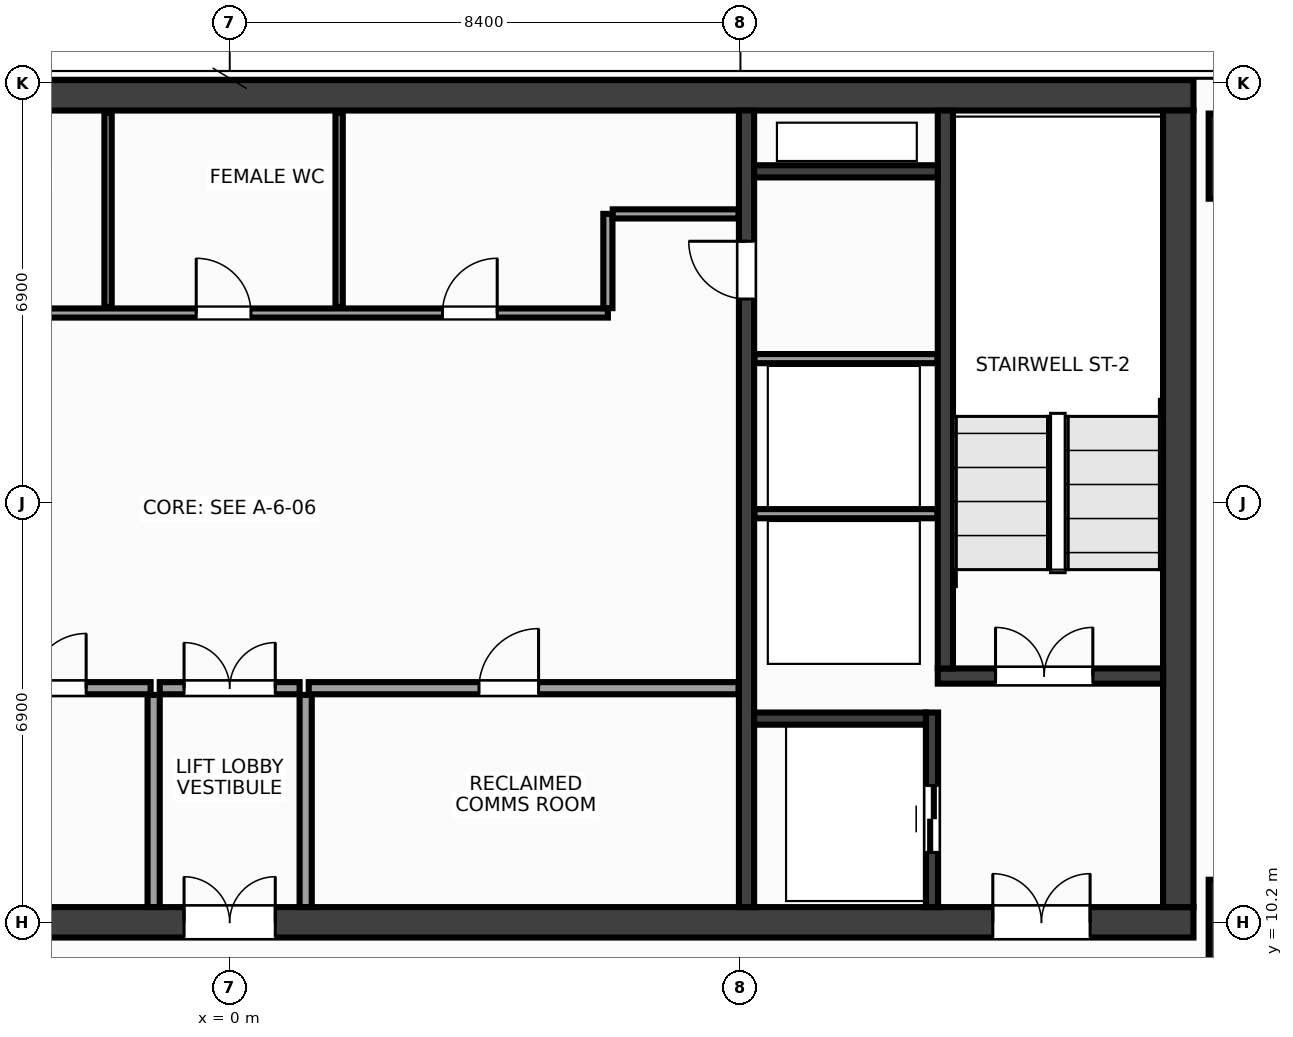
"""IFC4 building model, lengths in metres.
Left out: names, types, materials, properties, quantities, classifications, styles, units other than length and angle.
Written with IfcOpenShell. Run it as: python <this file> out.ifc"""

import sys

from ifc_helpers import new_model, si_unit, direction, frame, frame_2d, origin, origin_2d, place, context, subcontext, project, spatial, rectangle, extrude, source, transform, mapped, element, fill, save


model = new_model("IFC4")
c1 = context("Model", 3, precision=1e-05, world=origin(), true_north=direction((0.0, 1.0)))
c2 = subcontext(c1, "Body", "Model", "MODEL_VIEW")
j1 = project(units=[si_unit("LENGTHUNIT", "METRE"), si_unit("PLANEANGLEUNIT", "RADIAN")], contexts=[c1])
p1 = place(None, origin())
s1 = spatial("IfcSite", under=j1, at=p1, CompositionType="ELEMENT")
p2 = place(p1, origin())
s2 = spatial("IfcBuilding", under=s1, at=p2, CompositionType="ELEMENT")
p3 = place(p2, frame((0.0, 0.0, 239.6)))
s3 = spatial("IfcBuildingStorey", under=s2, at=p3, CompositionType="ELEMENT", Elevation=239.6)
m1 = source(origin(), c2, "Body", "SweptSolid", [
    extrude(rectangle(XDim=31.7, YDim=0.5, at=frame_2d((15.85, 0.0))), origin(), (0.0, 0.0, 1.0), 3.6),
])
p4 = place(p3, frame((-15.85, 23.8, 0.0), z_axis=(0.0, 0.0, 1.0), x_axis=(1.0, 0.0, 0.0)))
e1 = element("IfcWall", 1, at=p4, inside=s3, PredefinedType="SHEAR", context=c2, shape_type="MappedRepresentation", body=[
    mapped(m1, transform((0.0, 0.0, 0.0), x_axis=(1.0, 0.0, 0.0), y_axis=(0.0, 1.0, 0.0), z_axis=(0.0, 0.0, 1.0), scale=1.0)),
])
p5 = place(p3, frame((-15.85, 10.2, 0.0), z_axis=(0.0, 0.0, 1.0), x_axis=(1.0, 0.0, 0.0)))
e2 = element("IfcWall", 2, at=p5, inside=s3, PredefinedType="SHEAR", context=c2, shape_type="MappedRepresentation", body=[
    mapped(m1, transform((0.0, 0.0, 0.0), x_axis=(1.0, 0.0, 0.0), y_axis=(0.0, 1.0, 0.0), z_axis=(0.0, 0.0, 1.0), scale=1.0)),
])
p6 = place(p5, frame((1.7, 0.0, 0.0)))
e3 = element("IfcOpeningElement", 3, at=p6, cuts=e2, PredefinedType="OPENING", context=c2, shape_type="SweptSolid", body=[
    extrude(rectangle(XDim=1.6, YDim=2.15, at=frame_2d((0.8, 1.075))), frame((0.0, 0.262, 0.0), z_axis=(0.0, -1.0, 0.0), x_axis=(1.0, 0.0, 0.0)), (0.0, 0.0, 1.0), 0.524),
])
p7 = place(p5, frame((28.4, 0.0, 0.0)))
e4 = element("IfcOpeningElement", 4, at=p7, cuts=e2, PredefinedType="OPENING", context=c2, shape_type="SweptSolid", body=[
    extrude(rectangle(XDim=1.6, YDim=2.15, at=frame_2d((0.8, 1.075))), frame((0.0, 0.262, 0.0), z_axis=(0.0, -1.0, 0.0), x_axis=(1.0, 0.0, 0.0)), (0.0, 0.0, 1.0), 0.524),
])
p8 = place(p5, frame((15.1, 0.0, 0.0)))
e5 = element("IfcOpeningElement", 5, at=p8, cuts=e2, PredefinedType="OPENING", context=c2, shape_type="SweptSolid", body=[
    extrude(rectangle(XDim=1.5, YDim=2.2, at=frame_2d((0.75, 1.1))), frame((0.0, 0.262, 0.0), z_axis=(0.0, -1.0, 0.0), x_axis=(1.0, 0.0, 0.0)), (0.0, 0.0, 1.0), 0.524),
])
m2 = source(origin(), c2, "Body", "SweptSolid", [
    extrude(rectangle(XDim=13.1, YDim=0.5, at=frame_2d((6.55, 0.0))), origin(), (0.0, 0.0, 1.0), 3.6),
])
p9 = place(p3, frame((15.6, 10.45, 0.0), z_axis=(0.0, 0.0, 1.0), x_axis=(0.0, 1.0, 0.0)))
e6 = element("IfcWall", 6, at=p9, inside=s3, PredefinedType="SHEAR", context=c2, shape_type="MappedRepresentation", body=[
    mapped(m2, transform((0.0, 0.0, 0.0), x_axis=(1.0, 0.0, 0.0), y_axis=(0.0, 1.0, 0.0), z_axis=(0.0, 0.0, 1.0), scale=1.0)),
])
m3 = source(origin(), c2, "Body", "SweptSolid", [
    extrude(rectangle(XDim=13.1, YDim=0.25, at=frame_2d((6.55, 0.0))), origin(), (0.0, 0.0, 1.0), 3.6),
])
p10 = place(p3, frame((8.5, 10.45, 0.0), z_axis=(0.0, 0.0, 1.0), x_axis=(0.0, 1.0, 0.0)))
e7 = element("IfcWall", 7, at=p10, inside=s3, PredefinedType="SHEAR", context=c2, shape_type="MappedRepresentation", body=[
    mapped(m3, transform((0.0, 0.0, 0.0), x_axis=(1.0, 0.0, 0.0), y_axis=(0.0, 1.0, 0.0), z_axis=(0.0, 0.0, 1.0), scale=1.0)),
])
p11 = place(p10, frame((10.0, 0.0, 0.0)))
e8 = element("IfcOpeningElement", 8, at=p11, cuts=e7, PredefinedType="OPENING", context=c2, shape_type="SweptSolid", body=[
    extrude(rectangle(XDim=0.95, YDim=2.15, at=frame_2d((0.475, 1.075))), frame((0.0, 0.137, 0.0), z_axis=(0.0, -1.0, 0.0), x_axis=(1.0, 0.0, 0.0)), (0.0, 0.0, 1.0), 0.274),
])
m4 = source(origin(), c2, "Body", "SweptSolid", [
    extrude(rectangle(XDim=3.705, YDim=0.25, at=frame_2d((1.853, 0.0))), origin(), (0.0, 0.0, 1.0), 3.6),
])
p12 = place(p3, frame((11.645, 14.25, 0.0), z_axis=(0.0, 0.0, 1.0), x_axis=(1.0, 0.0, 0.0)))
e9 = element("IfcWall", 9, at=p12, inside=s3, PredefinedType="SHEAR", context=c2, shape_type="MappedRepresentation", body=[
    mapped(m4, transform((0.0, 0.0, 0.0), x_axis=(1.0, 0.0, 0.0), y_axis=(0.0, 1.0, 0.0), z_axis=(0.0, 0.0, 1.0), scale=1.0)),
])
p13 = place(p12, frame((0.95, 0.0, 0.0)))
e10 = element("IfcOpeningElement", 10, at=p13, cuts=e9, PredefinedType="OPENING", context=c2, shape_type="SweptSolid", body=[
    extrude(rectangle(XDim=1.6, YDim=2.15, at=frame_2d((0.8, 1.075))), frame((0.0, 0.137, 0.0), z_axis=(0.0, -1.0, 0.0), x_axis=(1.0, 0.0, 0.0)), (0.0, 0.0, 1.0), 0.274),
])
m5 = source(origin(), c2, "Body", "SweptSolid", [
    extrude(rectangle(XDim=9.175, YDim=0.25, at=frame_2d((4.587, 0.0))), origin(), (0.0, 0.0, 1.0), 3.6),
])
p14 = place(p3, frame((11.77, 14.375, 0.0), z_axis=(0.0, 0.0, 1.0), x_axis=(0.0, 1.0, 0.0)))
e11 = element("IfcWall", 11, at=p14, inside=s3, PredefinedType="SHEAR", context=c2, shape_type="MappedRepresentation", body=[
    mapped(m5, transform((0.0, 0.0, 0.0), x_axis=(1.0, 0.0, 0.0), y_axis=(0.0, 1.0, 0.0), z_axis=(0.0, 0.0, 1.0), scale=1.0)),
])
m6 = source(origin(), c2, "Body", "SweptSolid", [
    extrude(rectangle(XDim=3.2, YDim=0.2, at=frame_2d((1.6, 0.0))), origin(), (0.0, 0.0, 1.0), 3.6),
])
p15 = place(p3, frame((11.55, 10.45, 0.0), z_axis=(0.0, 0.0, 1.0), x_axis=(0.0, 1.0, 0.0)))
e12 = element("IfcWall", 12, at=p15, inside=s3, PredefinedType="SHEAR", context=c2, shape_type="MappedRepresentation", body=[
    mapped(m6, transform((0.0, 0.0, 0.0), x_axis=(1.0, 0.0, 0.0), y_axis=(0.0, 1.0, 0.0), z_axis=(0.0, 0.0, 1.0), scale=1.0)),
])
p16 = place(p15, frame((0.9, 0.0, 0.0)))
e13 = element("IfcOpeningElement", 13, at=p16, cuts=e12, PredefinedType="OPENING", context=c2, shape_type="SweptSolid", body=[
    extrude(rectangle(XDim=1.1, YDim=2.15, at=frame_2d((0.55, 1.075))), frame((0.0, 0.112, 0.0), z_axis=(0.0, -1.0, 0.0), x_axis=(1.0, 0.0, 0.0)), (0.0, 0.0, 1.0), 0.224),
])
m7 = source(origin(), c2, "Body", "SweptSolid", [
    extrude(rectangle(XDim=2.825, YDim=0.2, at=frame_2d((1.413, 0.0))), origin(), (0.0, 0.0, 1.0), 3.6),
])
p17 = place(p3, frame((8.625, 13.55, 0.0), z_axis=(0.0, 0.0, 1.0), x_axis=(1.0, 0.0, 0.0)))
e14 = element("IfcWall", 14, at=p17, inside=s3, PredefinedType="SHEAR", context=c2, shape_type="MappedRepresentation", body=[
    mapped(m7, transform((0.0, 0.0, 0.0), x_axis=(1.0, 0.0, 0.0), y_axis=(0.0, 1.0, 0.0), z_axis=(0.0, 0.0, 1.0), scale=1.0)),
])
m8 = source(origin(), c2, "Body", "SweptSolid", [
    extrude(rectangle(XDim=3.02, YDim=0.2, at=frame_2d((1.51, 0.0))), origin(), (0.0, 0.0, 1.0), 3.6),
])
p18 = place(p3, frame((8.625, 22.55, 0.0), z_axis=(0.0, 0.0, 1.0), x_axis=(1.0, 0.0, 0.0)))
e15 = element("IfcWall", 15, at=p18, inside=s3, PredefinedType="SHEAR", context=c2, shape_type="MappedRepresentation", body=[
    mapped(m8, transform((0.0, 0.0, 0.0), x_axis=(1.0, 0.0, 0.0), y_axis=(0.0, 1.0, 0.0), z_axis=(0.0, 0.0, 1.0), scale=1.0)),
])
m9 = source(origin(), c2, "Body", "SweptSolid", [
    extrude(rectangle(XDim=1.4, YDim=1.4, at=origin_2d()), origin(), (0.0, 0.0, 1.0), 3.6),
])
for number, where, z_axis, x_axis in (
    (16, (16.8, 10.2, 0.0), (0.0, 0.0, 1.0), (1.0, 0.0, 0.0)),
    (17, (16.8, 22.8, 0.0), (0.0, 0.0, 1.0), (1.0, 0.0, 0.0)),
):
    element("IfcColumn", number, at=place(p3, frame(where, z_axis=z_axis, x_axis=x_axis)), inside=s3, PredefinedType="COLUMN", context=c2, shape_type="MappedRepresentation", body=[
        mapped(m9, transform((0.0, 0.0, 0.0), x_axis=(1.0, 0.0, 0.0), y_axis=(0.0, 1.0, 0.0), z_axis=(0.0, 0.0, 1.0), scale=1.0)),
    ])
m10 = source(origin(), c2, "Body", "SweptSolid", [
    extrude(rectangle(XDim=3.01, YDim=0.15, at=frame_2d((1.505, 0.0))), origin(), (0.0, 0.0, 1.0), 3.37),
])
for number, where, z_axis, x_axis in (
    (18, (8.63, 16.92, 0.0), (0.0, 0.0, 1.0), (1.0, 0.0, 0.0)),
    (19, (8.63, 19.47, 0.0), (0.0, 0.0, 1.0), (1.0, 0.0, 0.0)),
):
    element("IfcWall", number, at=place(p3, frame(where, z_axis=z_axis, x_axis=x_axis)), inside=s3, PredefinedType="PARTITIONING", context=c2, shape_type="MappedRepresentation", body=[
        mapped(m10, transform((0.0, 0.0, 0.0), x_axis=(1.0, 0.0, 0.0), y_axis=(0.0, 1.0, 0.0), z_axis=(0.0, 0.0, 1.0), scale=1.0)),
    ])
m11 = source(origin(), c2, "Body", "SweptSolid", [
    extrude(rectangle(XDim=7.07, YDim=0.2, at=frame_2d((3.535, 0.0))), origin(), (0.0, 0.0, 1.0), 3.37),
])
p19 = place(p3, frame((-8.37, 14.05, 0.0), z_axis=(0.0, 0.0, 1.0), x_axis=(1.0, 0.0, 0.0)))
e20 = element("IfcWall", 20, at=p19, inside=s3, PredefinedType="PARTITIONING", context=c2, shape_type="MappedRepresentation", body=[
    mapped(m11, transform((0.0, 0.0, 0.0), x_axis=(1.0, 0.0, 0.0), y_axis=(0.0, 1.0, 0.0), z_axis=(0.0, 0.0, 1.0), scale=1.0)),
])
p20 = place(p19, frame((1.66, 0.0, 0.0)))
e21 = element("IfcOpeningElement", 21, at=p20, cuts=e20, PredefinedType="OPENING", context=c2, shape_type="SweptSolid", body=[
    extrude(rectangle(XDim=0.9, YDim=2.15, at=frame_2d((0.45, 1.075))), frame((0.0, 0.112, 0.0), z_axis=(0.0, -1.0, 0.0), x_axis=(1.0, 0.0, 0.0)), (0.0, 0.0, 1.0), 0.224),
])
p21 = place(p19, frame((5.11, 0.0, 0.0)))
e22 = element("IfcOpeningElement", 22, at=p21, cuts=e20, PredefinedType="OPENING", context=c2, shape_type="SweptSolid", body=[
    extrude(rectangle(XDim=0.9, YDim=2.15, at=frame_2d((0.45, 1.075))), frame((0.0, 0.112, 0.0), z_axis=(0.0, -1.0, 0.0), x_axis=(1.0, 0.0, 0.0)), (0.0, 0.0, 1.0), 0.224),
])
p22 = place(p3, frame((1.3, 14.05, 0.0), z_axis=(0.0, 0.0, 1.0), x_axis=(1.0, 0.0, 0.0)))
e23 = element("IfcWall", 23, at=p22, inside=s3, PredefinedType="PARTITIONING", context=c2, shape_type="MappedRepresentation", body=[
    mapped(m11, transform((0.0, 0.0, 0.0), x_axis=(1.0, 0.0, 0.0), y_axis=(0.0, 1.0, 0.0), z_axis=(0.0, 0.0, 1.0), scale=1.0)),
])
p23 = place(p22, frame((2.8, 0.0, 0.0)))
e24 = element("IfcOpeningElement", 24, at=p23, cuts=e23, PredefinedType="OPENING", context=c2, shape_type="SweptSolid", body=[
    extrude(rectangle(XDim=0.98, YDim=2.15, at=frame_2d((0.49, 1.075))), frame((0.0, 0.112, 0.0), z_axis=(0.0, -1.0, 0.0), x_axis=(1.0, 0.0, 0.0)), (0.0, 0.0, 1.0), 0.224),
])
m12 = source(origin(), c2, "Body", "SweptSolid", [
    extrude(rectangle(XDim=3.49, YDim=0.2, at=frame_2d((1.745, 0.0))), origin(), (0.0, 0.0, 1.0), 3.37),
])
for number, where, z_axis, x_axis in (
    (25, (-1.25, 10.45, 0.0), (0.0, 0.0, 1.0), (0.0, 1.0, 0.0)),
    (26, (1.25, 10.45, 0.0), (0.0, 0.0, 1.0), (0.0, 1.0, 0.0)),
):
    element("IfcWall", number, at=place(p3, frame(where, z_axis=z_axis, x_axis=x_axis)), inside=s3, PredefinedType="PARTITIONING", context=c2, shape_type="MappedRepresentation", body=[
        mapped(m12, transform((0.0, 0.0, 0.0), x_axis=(1.0, 0.0, 0.0), y_axis=(0.0, 1.0, 0.0), z_axis=(0.0, 0.0, 1.0), scale=1.0)),
    ])
m13 = source(origin(), c2, "Body", "SweptSolid", [
    extrude(rectangle(XDim=2.3, YDim=0.2, at=frame_2d((1.15, 0.0))), origin(), (0.0, 0.0, 1.0), 3.37),
])
p24 = place(p3, frame((-1.15, 14.05, 0.0), z_axis=(0.0, 0.0, 1.0), x_axis=(1.0, 0.0, 0.0)))
e27 = element("IfcWall", 27, at=p24, inside=s3, PredefinedType="PARTITIONING", context=c2, shape_type="MappedRepresentation", body=[
    mapped(m13, transform((0.0, 0.0, 0.0), x_axis=(1.0, 0.0, 0.0), y_axis=(0.0, 1.0, 0.0), z_axis=(0.0, 0.0, 1.0), scale=1.0)),
])
p25 = place(p24, frame((0.4, 0.0, 0.0)))
e28 = element("IfcOpeningElement", 28, at=p25, cuts=e27, PredefinedType="OPENING", context=c2, shape_type="SweptSolid", body=[
    extrude(rectangle(XDim=1.5, YDim=2.2, at=frame_2d((0.75, 1.1))), frame((0.0, 0.112, 0.0), z_axis=(0.0, -1.0, 0.0), x_axis=(1.0, 0.0, 0.0)), (0.0, 0.0, 1.0), 0.224),
])
m14 = source(origin(), c2, "Body", "SweptSolid", [
    extrude(rectangle(XDim=14.59, YDim=0.15, at=frame_2d((7.295, 0.0))), origin(), (0.0, 0.0, 1.0), 3.37),
])
p26 = place(p3, frame((-8.37, 20.22, 0.0), z_axis=(0.0, 0.0, 1.0), x_axis=(1.0, 0.0, 0.0)))
e29 = element("IfcWall", 29, at=p26, inside=s3, PredefinedType="PARTITIONING", context=c2, shape_type="MappedRepresentation", body=[
    mapped(m14, transform((0.0, 0.0, 0.0), x_axis=(1.0, 0.0, 0.0), y_axis=(0.0, 1.0, 0.0), z_axis=(0.0, 0.0, 1.0), scale=1.0)),
])
p27 = place(p26, frame((1.06, 0.0, 0.0)))
e30 = element("IfcOpeningElement", 30, at=p27, cuts=e29, PredefinedType="OPENING", context=c2, shape_type="SweptSolid", body=[
    extrude(rectangle(XDim=0.9, YDim=2.15, at=frame_2d((0.45, 1.075))), frame((0.0, 0.087, 0.0), z_axis=(0.0, -1.0, 0.0), x_axis=(1.0, 0.0, 0.0)), (0.0, 0.0, 1.0), 0.174),
])
p28 = place(p26, frame((4.22, 0.0, 0.0)))
e31 = element("IfcOpeningElement", 31, at=p28, cuts=e29, PredefinedType="OPENING", context=c2, shape_type="SweptSolid", body=[
    extrude(rectangle(XDim=0.9, YDim=2.15, at=frame_2d((0.45, 1.075))), frame((0.0, 0.087, 0.0), z_axis=(0.0, -1.0, 0.0), x_axis=(1.0, 0.0, 0.0)), (0.0, 0.0, 1.0), 0.174),
])
p29 = place(p26, frame((7.82, 0.0, 0.0)))
e32 = element("IfcOpeningElement", 32, at=p29, cuts=e29, PredefinedType="OPENING", context=c2, shape_type="SweptSolid", body=[
    extrude(rectangle(XDim=0.9, YDim=2.15, at=frame_2d((0.45, 1.075))), frame((0.0, 0.087, 0.0), z_axis=(0.0, -1.0, 0.0), x_axis=(1.0, 0.0, 0.0)), (0.0, 0.0, 1.0), 0.174),
])
p30 = place(p26, frame((11.87, 0.0, 0.0)))
e33 = element("IfcOpeningElement", 33, at=p30, cuts=e29, PredefinedType="OPENING", context=c2, shape_type="SweptSolid", body=[
    extrude(rectangle(XDim=0.9, YDim=2.15, at=frame_2d((0.45, 1.075))), frame((0.0, 0.087, 0.0), z_axis=(0.0, -1.0, 0.0), x_axis=(1.0, 0.0, 0.0)), (0.0, 0.0, 1.0), 0.174),
])
m15 = source(origin(), c2, "Body", "SweptSolid", [
    extrude(rectangle(XDim=1.55, YDim=0.15, at=frame_2d((0.775, 0.0))), origin(), (0.0, 0.0, 1.0), 3.37),
])
p31 = place(p3, frame((6.22, 20.3, 0.0), z_axis=(0.0, 0.0, 1.0), x_axis=(0.0, 1.0, 0.0)))
e34 = element("IfcWall", 34, at=p31, inside=s3, PredefinedType="PARTITIONING", context=c2, shape_type="MappedRepresentation", body=[
    mapped(m15, transform((0.0, 0.0, 0.0), x_axis=(1.0, 0.0, 0.0), y_axis=(0.0, 1.0, 0.0), z_axis=(0.0, 0.0, 1.0), scale=1.0)),
])
m16 = source(origin(), c2, "Body", "SweptSolid", [
    extrude(rectangle(XDim=2.07, YDim=0.15, at=frame_2d((1.035, 0.0))), origin(), (0.0, 0.0, 1.0), 3.37),
])
p32 = place(p3, frame((6.3, 21.85, 0.0), z_axis=(0.0, 0.0, 1.0), x_axis=(1.0, 0.0, 0.0)))
e35 = element("IfcWall", 35, at=p32, inside=s3, PredefinedType="PARTITIONING", context=c2, shape_type="MappedRepresentation", body=[
    mapped(m16, transform((0.0, 0.0, 0.0), x_axis=(1.0, 0.0, 0.0), y_axis=(0.0, 1.0, 0.0), z_axis=(0.0, 0.0, 1.0), scale=1.0)),
])
m17 = source(origin(), c2, "Body", "SweptSolid", [
    extrude(rectangle(XDim=3.19, YDim=0.12, at=frame_2d((1.595, 0.0))), origin(), (0.0, 0.0, 1.0), 3.37),
])
for number, where, z_axis, x_axis in (
    (36, (-2.0, 20.32, 0.0), (0.0, 0.0, 1.0), (0.0, 1.0, 0.0)),
    (37, (1.8, 20.32, 0.0), (0.0, 0.0, 1.0), (0.0, 1.0, 0.0)),
):
    element("IfcWall", number, at=place(p3, frame(where, z_axis=z_axis, x_axis=x_axis)), inside=s3, PredefinedType="PARTITIONING", context=c2, shape_type="MappedRepresentation", body=[
        mapped(m17, transform((0.0, 0.0, 0.0), x_axis=(1.0, 0.0, 0.0), y_axis=(0.0, 1.0, 0.0), z_axis=(0.0, 0.0, 1.0), scale=1.0)),
    ])
m18 = source(origin(), c2, "Body", "SweptSolid", [
    extrude(rectangle(XDim=1.6, YDim=2.15, at=frame_2d((0.8, 1.075))), frame((0.0, 0.025, 0.0), z_axis=(0.0, -1.0, 0.0), x_axis=(1.0, 0.0, 0.0)), (0.0, 0.0, 1.0), 0.05),
])
p33 = place(p13, origin())
e38 = element("IfcDoor", 38, at=p33, inside=s3, OperationType="DOUBLE_DOOR_SINGLE_SWING", PredefinedType="DOOR", context=c2, shape_type="MappedRepresentation", body=[
    mapped(m18, transform((0.0, 0.0, 0.0), x_axis=(1.0, 0.0, 0.0), y_axis=(0.0, 1.0, 0.0), z_axis=(0.0, 0.0, 1.0), scale=1.0)),
])
fill(e10, e38)
p34 = place(p7, origin())
e39 = element("IfcDoor", 39, at=p34, inside=s3, OperationType="DOUBLE_DOOR_SINGLE_SWING", PredefinedType="DOOR", context=c2, shape_type="MappedRepresentation", body=[
    mapped(m18, transform((0.0, 0.0, 0.0), x_axis=(1.0, 0.0, 0.0), y_axis=(0.0, 1.0, 0.0), z_axis=(0.0, 0.0, 1.0), scale=1.0)),
])
fill(e4, e39)
m19 = source(origin(), c2, "Body", "SweptSolid", [
    extrude(rectangle(XDim=1.1, YDim=2.15, at=frame_2d((0.55, 1.075))), frame((0.0, 0.025, 0.0), z_axis=(0.0, -1.0, 0.0), x_axis=(1.0, 0.0, 0.0)), (0.0, 0.0, 1.0), 0.05),
])
p35 = place(p16, origin())
e40 = element("IfcDoor", 40, at=p35, inside=s3, OperationType="DOUBLE_DOOR_SLIDING", PredefinedType="DOOR", context=c2, shape_type="MappedRepresentation", body=[
    mapped(m19, transform((0.0, 0.0, 0.0), x_axis=(1.0, 0.0, 0.0), y_axis=(0.0, 1.0, 0.0), z_axis=(0.0, 0.0, 1.0), scale=1.0)),
])
fill(e13, e40)
m20 = source(origin(), c2, "Body", "SweptSolid", [
    extrude(rectangle(XDim=0.95, YDim=2.15, at=frame_2d((0.475, 1.075))), frame((0.0, 0.025, 0.0), z_axis=(0.0, -1.0, 0.0), x_axis=(1.0, 0.0, 0.0)), (0.0, 0.0, 1.0), 0.05),
])
p36 = place(p11, origin())
e41 = element("IfcDoor", 41, at=p36, inside=s3, OperationType="SINGLE_SWING_RIGHT", PredefinedType="DOOR", context=c2, shape_type="MappedRepresentation", body=[
    mapped(m20, transform((0.0, 0.0, 0.0), x_axis=(1.0, 0.0, 0.0), y_axis=(0.0, 1.0, 0.0), z_axis=(0.0, 0.0, 1.0), scale=1.0)),
])
fill(e8, e41)
m21 = source(origin(), c2, "Body", "SweptSolid", [
    extrude(rectangle(XDim=0.9, YDim=2.15, at=frame_2d((0.45, 1.075))), frame((0.0, 0.025, 0.0), z_axis=(0.0, -1.0, 0.0), x_axis=(1.0, 0.0, 0.0)), (0.0, 0.0, 1.0), 0.05),
])
p37 = place(p21, origin())
e42 = element("IfcDoor", 42, at=p37, inside=s3, OperationType="SINGLE_SWING_RIGHT", PredefinedType="DOOR", context=c2, shape_type="MappedRepresentation", body=[
    mapped(m21, transform((0.0, 0.0, 0.0), x_axis=(1.0, 0.0, 0.0), y_axis=(0.0, 1.0, 0.0), z_axis=(0.0, 0.0, 1.0), scale=1.0)),
])
fill(e22, e42)
m22 = source(origin(), c2, "Body", "SweptSolid", [
    extrude(rectangle(XDim=0.98, YDim=2.15, at=frame_2d((0.49, 1.075))), frame((0.0, 0.025, 0.0), z_axis=(0.0, -1.0, 0.0), x_axis=(1.0, 0.0, 0.0)), (0.0, 0.0, 1.0), 0.05),
])
p38 = place(p23, origin())
e43 = element("IfcDoor", 43, at=p38, inside=s3, OperationType="SINGLE_SWING_RIGHT", PredefinedType="DOOR", context=c2, shape_type="MappedRepresentation", body=[
    mapped(m22, transform((0.0, 0.0, 0.0), x_axis=(1.0, 0.0, 0.0), y_axis=(0.0, 1.0, 0.0), z_axis=(0.0, 0.0, 1.0), scale=1.0)),
])
fill(e24, e43)
m23 = source(origin(), c2, "Body", "SweptSolid", [
    extrude(rectangle(XDim=1.5, YDim=2.2, at=frame_2d((0.75, 1.1))), frame((0.0, 0.025, 0.0), z_axis=(0.0, -1.0, 0.0), x_axis=(1.0, 0.0, 0.0)), (0.0, 0.0, 1.0), 0.05),
])
p39 = place(p25, origin())
e44 = element("IfcDoor", 44, at=p39, inside=s3, OperationType="DOUBLE_DOOR_SINGLE_SWING", PredefinedType="DOOR", context=c2, shape_type="MappedRepresentation", body=[
    mapped(m23, transform((0.0, 0.0, 0.0), x_axis=(1.0, 0.0, 0.0), y_axis=(0.0, 1.0, 0.0), z_axis=(0.0, 0.0, 1.0), scale=1.0)),
])
fill(e28, e44)
p40 = place(p8, origin())
e45 = element("IfcDoor", 45, at=p40, inside=s3, OperationType="DOUBLE_DOOR_SINGLE_SWING", PredefinedType="DOOR", context=c2, shape_type="MappedRepresentation", body=[
    mapped(m23, transform((0.0, 0.0, 0.0), x_axis=(1.0, 0.0, 0.0), y_axis=(0.0, 1.0, 0.0), z_axis=(0.0, 0.0, 1.0), scale=1.0)),
])
fill(e5, e45)
p41 = place(p29, origin())
e46 = element("IfcDoor", 46, at=p41, inside=s3, OperationType="SINGLE_SWING_LEFT", PredefinedType="DOOR", context=c2, shape_type="MappedRepresentation", body=[
    mapped(m21, transform((0.0, 0.0, 0.0), x_axis=(1.0, 0.0, 0.0), y_axis=(0.0, 1.0, 0.0), z_axis=(0.0, 0.0, 1.0), scale=1.0)),
])
fill(e32, e46)
p42 = place(p30, origin())
e47 = element("IfcDoor", 47, at=p42, inside=s3, OperationType="SINGLE_SWING_RIGHT", PredefinedType="DOOR", context=c2, shape_type="MappedRepresentation", body=[
    mapped(m21, transform((0.0, 0.0, 0.0), x_axis=(1.0, 0.0, 0.0), y_axis=(0.0, 1.0, 0.0), z_axis=(0.0, 0.0, 1.0), scale=1.0)),
])
fill(e33, e47)
save(model, sys.argv[1])
